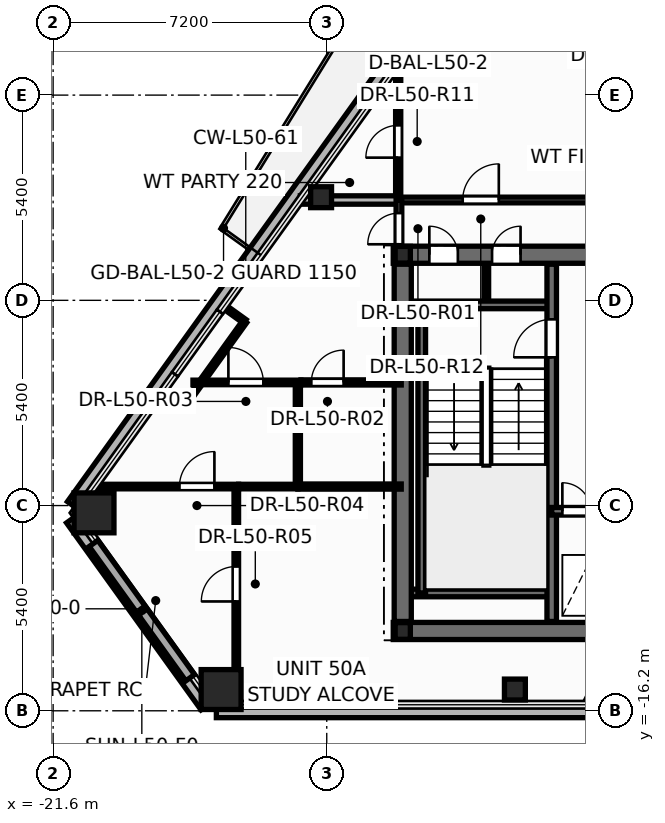
"""IFC4 building model, lengths in metres.
Left out: names, types, materials, properties, quantities, classifications, styles, units other than length and angle.
Written with IfcOpenShell. Run it as: python <this file> out.ifc"""

import sys

from ifc_helpers import new_model, si_unit, direction, frame, frame_2d, origin, origin_2d, place, context, subcontext, project, spatial, rectangle, hollow_rectangle, hollow_circle, i_section, extrude, element, fill, save


model = new_model("IFC4")
c1 = context("Model", 3, precision=1e-05, world=origin(), true_north=direction((0.0, 1.0)))
c2 = subcontext(c1, "Body", "Model", "MODEL_VIEW")
j1 = project(units=[si_unit("LENGTHUNIT", "METRE"), si_unit("PLANEANGLEUNIT", "RADIAN")], contexts=[c1])
p1 = place(None, origin())
s1 = spatial("IfcSite", under=j1, at=p1, CompositionType="ELEMENT")
p2 = place(p1, origin())
s2 = spatial("IfcBuilding", under=s1, at=p2, CompositionType="ELEMENT")
p3 = place(p2, frame((0.0, 0.0, 192.9)))
s3 = spatial("IfcBuildingStorey", under=s2, at=p3, CompositionType="ELEMENT", Elevation=192.9)
for number, where, z_axis, x_axis in (
    (1, (-20.524, -10.992, 0.0), (0.0, 0.0, 1.0), (1.0, 0.0, 0.0)),
    (2, (-17.18, -15.641, 0.0), (0.0, 0.0, 1.0), (1.0, 0.0, 0.0)),
):
    element("IfcColumn", number, at=place(p3, frame(where, z_axis=z_axis, x_axis=x_axis)), inside=s3, PredefinedType="COLUMN", context=c2, shape_type="SweptSolid", body=[
        extrude(hollow_rectangle(XDim=1.05, YDim=1.05, WallThickness=0.045, at=origin_2d()), origin(), (0.0, 0.0, 1.0), 3.6),
    ])
for number, where, z_axis, x_axis in (
    (3, (-9.449, -15.641, 0.0), (0.0, 0.0, 1.0), (1.0, 0.0, 0.0)),
    (4, (-14.549, -2.686, 0.0), (0.0, 0.0, 1.0), (1.0, 0.0, 0.0)),
):
    element("IfcColumn", number, at=place(p3, frame(where, z_axis=z_axis, x_axis=x_axis)), inside=s3, PredefinedType="COLUMN", context=c2, shape_type="SweptSolid", body=[
        extrude(hollow_circle(Radius=0.275, WallThickness=0.024, at=origin_2d()), origin(), (0.0, 0.0, 1.0), 3.6),
    ])
for number, where, z_axis, x_axis in (
    (5, (-12.4, -14.1, 0.0), (0.0, 0.0, 1.0), (1.0, 0.0, 0.0)),
    (6, (-12.4, -4.2, 0.0), (0.0, 0.0, 1.0), (1.0, 0.0, 0.0)),
):
    element("IfcColumn", number, at=place(p3, frame(where, z_axis=z_axis, x_axis=x_axis)), inside=s3, PredefinedType="COLUMN", context=c2, shape_type="SweptSolid", body=[
        extrude(i_section(OverallWidth=0.4, OverallDepth=0.44, WebThickness=0.028, FlangeThickness=0.04, at=origin_2d()), origin(), (0.0, 0.0, 1.0), 3.6),
    ])
p4 = place(p3, frame((-21.1, -11.15, -0.2), z_axis=(0.0, 0.0, 1.0), x_axis=(0.583978848749, -0.811768873642, 0.0)))
e7 = element("IfcWall", 7, at=p4, inside=s3, PredefinedType="PARAPET", context=c2, shape_type="SweptSolid", body=[
    extrude(rectangle(XDim=6.06, YDim=0.36, at=frame_2d((3.03, 0.0))), origin(), (0.0, 0.0, 1.0), 0.38),
])
p5 = place(p3, frame((-17.305, -16.201, -0.2), z_axis=(0.0, 0.0, 1.0), x_axis=(1.0, 0.0, 0.0)))
e8 = element("IfcWall", 8, at=p5, inside=s3, PredefinedType="PARAPET", context=c2, shape_type="SweptSolid", body=[
    extrude(rectangle(XDim=34.609, YDim=0.36, at=frame_2d((17.305, 0.0))), origin(), (0.0, 0.0, 1.0), 0.38),
])
p6 = place(p3, frame((-12.245, 1.475, -0.2), z_axis=(0.0, 0.0, 1.0), x_axis=(-0.583980615351, -0.811767602762, 0.0)))
e9 = element("IfcWall", 9, at=p6, inside=s3, PredefinedType="PARAPET", context=c2, shape_type="SweptSolid", body=[
    extrude(rectangle(XDim=15.123, YDim=0.36, at=frame_2d((7.562, 0.0))), origin(), (0.0, 0.0, 1.0), 0.38),
])
p7 = place(p3, frame((-10.2, -5.52, 0.0), z_axis=(0.0, 0.0, 1.0), x_axis=(0.0, 1.0, 0.0)))
e10 = element("IfcWall", 10, at=p7, inside=s3, PredefinedType="PARTITIONING", context=c2, shape_type="SweptSolid", body=[
    extrude(rectangle(XDim=1.12, YDim=0.12, at=frame_2d((0.56, 0.0))), origin(), (0.0, 0.0, 1.0), 3.35),
])
p8 = place(p3, frame((-12.65, -14.1, 0.0), z_axis=(0.0, 0.0, 1.0), x_axis=(1.0, 0.0, 0.0)))
e11 = element("IfcWall", 11, at=p8, inside=s3, PredefinedType="SHEAR", context=c2, shape_type="SweptSolid", body=[
    extrude(rectangle(XDim=25.3, YDim=0.45, at=frame_2d((12.65, 0.0))), origin(), (0.0, 0.0, 1.0), 3.6),
])
p9 = place(p3, frame((-12.65, -4.2, 0.0), z_axis=(0.0, 0.0, 1.0), x_axis=(1.0, 0.0, 0.0)))
e12 = element("IfcWall", 12, at=p9, inside=s3, PredefinedType="SHEAR", context=c2, shape_type="SweptSolid", body=[
    extrude(rectangle(XDim=25.3, YDim=0.45, at=frame_2d((12.65, 0.0))), origin(), (0.0, 0.0, 1.0), 3.6),
])
p10 = place(p9, frame((0.95, 0.0, 0.0)))
e13 = element("IfcOpeningElement", 13, at=p10, cuts=e12, PredefinedType="OPENING", context=c2, shape_type="SweptSolid", body=[
    extrude(rectangle(XDim=0.756, YDim=2.054, at=frame_2d((0.375, 1.027))), frame((0.0, 0.235, 0.0), z_axis=(0.0, -1.0, 0.0), x_axis=(1.0, 0.0, 0.0)), (0.0, 0.0, 1.0), 0.47),
])
p11 = place(p9, frame((2.6, 0.0, 0.0)))
e14 = element("IfcOpeningElement", 14, at=p11, cuts=e12, PredefinedType="OPENING", context=c2, shape_type="SweptSolid", body=[
    extrude(rectangle(XDim=0.756, YDim=2.054, at=frame_2d((0.375, 1.027))), frame((0.0, 0.235, 0.0), z_axis=(0.0, -1.0, 0.0), x_axis=(1.0, 0.0, 0.0)), (0.0, 0.0, 1.0), 0.47),
])
p12 = place(p9, frame((21.85, 0.0, 0.0)))
e15 = element("IfcOpeningElement", 15, at=p12, cuts=e12, PredefinedType="OPENING", context=c2, shape_type="SweptSolid", body=[
    extrude(rectangle(XDim=0.756, YDim=2.054, at=frame_2d((0.375, 1.027))), frame((0.0, 0.235, 0.0), z_axis=(0.0, -1.0, 0.0), x_axis=(1.0, 0.0, 0.0)), (0.0, 0.0, 1.0), 0.47),
])
p13 = place(p9, frame((23.5, 0.0, 0.0)))
e16 = element("IfcOpeningElement", 16, at=p13, cuts=e12, PredefinedType="OPENING", context=c2, shape_type="SweptSolid", body=[
    extrude(rectangle(XDim=0.756, YDim=2.054, at=frame_2d((0.375, 1.027))), frame((0.0, 0.235, 0.0), z_axis=(0.0, -1.0, 0.0), x_axis=(1.0, 0.0, 0.0)), (0.0, 0.0, 1.0), 0.47),
])
p14 = place(p9, frame((5.85, 0.0, 0.0)))
e17 = element("IfcOpeningElement", 17, at=p14, cuts=e12, PredefinedType="OPENING", context=c2, shape_type="SweptSolid", body=[
    extrude(rectangle(XDim=1.006, YDim=2.104, at=frame_2d((0.5, 1.052))), frame((0.0, 0.235, 0.0), z_axis=(0.0, -1.0, 0.0), x_axis=(1.0, 0.0, 0.0)), (0.0, 0.0, 1.0), 0.47),
])
p15 = place(p9, frame((10.35, 0.0, 0.0)))
e18 = element("IfcOpeningElement", 18, at=p15, cuts=e12, PredefinedType="OPENING", context=c2, shape_type="SweptSolid", body=[
    extrude(rectangle(XDim=1.406, YDim=2.154, at=frame_2d((0.7, 1.077))), frame((0.0, 0.235, 0.0), z_axis=(0.0, -1.0, 0.0), x_axis=(1.0, 0.0, 0.0)), (0.0, 0.0, 1.0), 0.47),
])
p16 = place(p9, frame((18.45, 0.0, 0.0)))
e19 = element("IfcOpeningElement", 19, at=p16, cuts=e12, PredefinedType="OPENING", context=c2, shape_type="SweptSolid", body=[
    extrude(rectangle(XDim=1.006, YDim=2.104, at=frame_2d((0.5, 1.052))), frame((0.0, 0.235, 0.0), z_axis=(0.0, -1.0, 0.0), x_axis=(1.0, 0.0, 0.0)), (0.0, 0.0, 1.0), 0.47),
])
for number, where, z_axis, x_axis in (
    (20, (-12.35, -5.52, 0.0), (0.0, 0.0, 1.0), (1.0, 0.0, 0.0)),
    (21, (-12.35, -13.1, 0.0), (0.0, 0.0, 1.0), (1.0, 0.0, 0.0)),
):
    element("IfcWall", number, at=place(p3, frame(where, z_axis=z_axis, x_axis=x_axis)), inside=s3, PredefinedType="SOLIDWALL", context=c2, shape_type="SweptSolid", body=[
        extrude(rectangle(XDim=3.87, YDim=0.2, at=frame_2d((1.935, 0.0))), origin(), (0.0, 0.0, 1.0), 3.6),
    ])
p17 = place(p3, frame((-11.9, -13.1, 0.0), z_axis=(0.0, 0.0, 1.0), x_axis=(0.0, 1.0, 0.0)))
e22 = element("IfcWall", 22, at=p17, inside=s3, PredefinedType="SOLIDWALL", context=c2, shape_type="SweptSolid", body=[
    extrude(rectangle(XDim=7.58, YDim=0.2, at=frame_2d((3.79, 0.0))), origin(), (0.0, 0.0, 1.0), 3.6),
])
p18 = place(p3, frame((-8.48, -13.85, 0.0), z_axis=(0.0, 0.0, 1.0), x_axis=(0.0, 1.0, 0.0)))
e23 = element("IfcWall", 23, at=p18, inside=s3, PredefinedType="SHEAR", context=c2, shape_type="SweptSolid", body=[
    extrude(rectangle(XDim=9.4, YDim=0.25, at=frame_2d((4.7, 0.0))), origin(), (0.0, 0.0, 1.0), 3.6),
])
p19 = place(p18, frame((6.95, 0.0, 0.0)))
e24 = element("IfcOpeningElement", 24, at=p19, cuts=e23, PredefinedType="OPENING", context=c2, shape_type="SweptSolid", body=[
    extrude(rectangle(XDim=1.006, YDim=2.104, at=frame_2d((0.5, 1.052))), frame((0.0, 0.135, 0.0), z_axis=(0.0, -1.0, 0.0), x_axis=(1.0, 0.0, 0.0)), (0.0, 0.0, 1.0), 0.27),
])
p20 = place(p3, frame((-8.48, -10.95, 0.0), z_axis=(0.0, 0.0, 1.0), x_axis=(1.0, 0.0, 0.0)))
e25 = element("IfcWall", 25, at=p20, inside=s3, PredefinedType="SOLIDWALL", context=c2, shape_type="SweptSolid", body=[
    extrude(rectangle(XDim=3.36, YDim=0.2, at=frame_2d((1.68, 0.0))), origin(), (0.0, 0.0, 1.0), 3.6),
])
p21 = place(p20, frame((0.28, 0.0, 0.0)))
e26 = element("IfcOpeningElement", 26, at=p21, cuts=e25, PredefinedType="OPENING", context=c2, shape_type="SweptSolid", body=[
    extrude(rectangle(XDim=0.756, YDim=2.054, at=frame_2d((0.375, 1.027))), frame((0.0, 0.11, 0.0), z_axis=(0.0, -1.0, 0.0), x_axis=(1.0, 0.0, 0.0)), (0.0, 0.0, 1.0), 0.22),
])
p22 = place(p20, frame((1.85, 0.0, 0.0)))
e27 = element("IfcOpeningElement", 27, at=p22, cuts=e25, PredefinedType="OPENING", context=c2, shape_type="SweptSolid", body=[
    extrude(rectangle(XDim=1.106, YDim=2.104, at=frame_2d((0.55, 1.052))), frame((0.0, 0.11, 0.0), z_axis=(0.0, -1.0, 0.0), x_axis=(1.0, 0.0, 0.0)), (0.0, 0.0, 1.0), 0.22),
])
p23 = place(p3, frame((-12.4, -13.85, 0.0), z_axis=(0.0, 0.0, 1.0), x_axis=(0.0, 1.0, 0.0)))
e28 = element("IfcWall", 28, at=p23, inside=s3, PredefinedType="SHEAR", context=c2, shape_type="SweptSolid", body=[
    extrude(rectangle(XDim=9.4, YDim=0.45, at=frame_2d((4.7, 0.0))), origin(), (0.0, 0.0, 1.0), 3.6),
])
p24 = place(p3, frame((-12.5, -2.76, 0.0), z_axis=(0.0, 0.0, 1.0), x_axis=(1.0, 0.0, 0.0)))
e29 = element("IfcWall", 29, at=p24, inside=s3, PredefinedType="PARTITIONING", context=c2, shape_type="SweptSolid", body=[
    extrude(rectangle(XDim=8.18, YDim=0.15, at=frame_2d((4.09, 0.0))), origin(), (0.0, 0.0, 1.0), 2.325),
])
p25 = place(p24, frame((1.678, 0.0, 0.0)))
e30 = element("IfcOpeningElement", 30, at=p25, cuts=e29, PredefinedType="OPENING", context=c2, shape_type="SweptSolid", body=[
    extrude(rectangle(XDim=0.956, YDim=2.104, at=frame_2d((0.475, 1.052))), frame((0.0, 0.085, 0.0), z_axis=(0.0, -1.0, 0.0), x_axis=(1.0, 0.0, 0.0)), (0.0, 0.0, 1.0), 0.17),
])
p26 = place(p3, frame((-16.78, -16.041, 0.0), z_axis=(0.0, 0.0, 1.0), x_axis=(0.0, 1.0, 0.0)))
e31 = element("IfcWall", 31, at=p26, inside=s3, PredefinedType="PARTITIONING", context=c2, shape_type="SweptSolid", body=[
    extrude(rectangle(XDim=5.741, YDim=0.12, at=frame_2d((2.871, 0.0))), origin(), (0.0, 0.0, 1.0), 2.792),
])
p27 = place(p26, frame((2.718, 0.0, 0.0)))
e32 = element("IfcOpeningElement", 32, at=p27, cuts=e31, PredefinedType="OPENING", context=c2, shape_type="SweptSolid", body=[
    extrude(rectangle(XDim=0.926, YDim=2.104, at=frame_2d((0.46, 1.052))), frame((0.0, 0.07, 0.0), z_axis=(0.0, -1.0, 0.0), x_axis=(1.0, 0.0, 0.0)), (0.0, 0.0, 1.0), 0.14),
])
p28 = place(p3, frame((-20.519, -10.3, 0.0), z_axis=(0.0, 0.0, 1.0), x_axis=(1.0, 0.0, 0.0)))
e33 = element("IfcWall", 33, at=p28, inside=s3, PredefinedType="PARTITIONING", context=c2, shape_type="SweptSolid", body=[
    extrude(rectangle(XDim=3.799, YDim=0.12, at=frame_2d((1.899, 0.0))), origin(), (0.0, 0.0, 1.0), 2.325),
])
p29 = place(p28, frame((2.243, 0.0, 0.0)))
e34 = element("IfcOpeningElement", 34, at=p29, cuts=e33, PredefinedType="OPENING", context=c2, shape_type="SweptSolid", body=[
    extrude(rectangle(XDim=0.926, YDim=2.104, at=frame_2d((0.46, 1.052))), frame((0.0, 0.07, 0.0), z_axis=(0.0, -1.0, 0.0), x_axis=(1.0, 0.0, 0.0)), (0.0, 0.0, 1.0), 0.14),
])
p30 = place(p3, frame((-12.52, -2.76, 0.0), z_axis=(0.0, 0.0, 1.0), x_axis=(0.0, 1.0, 0.0)))
e35 = element("IfcWall", 35, at=p30, inside=s3, PredefinedType="PARTITIONING", context=c2, shape_type="SweptSolid", body=[
    extrude(rectangle(XDim=3.579, YDim=0.135, at=frame_2d((1.79, 0.0))), origin(), (0.0, 0.0, 1.0), 2.625),
])
p31 = place(p30, frame((1.115, 0.0, 0.0)))
e36 = element("IfcOpeningElement", 36, at=p31, cuts=e35, PredefinedType="OPENING", context=c2, shape_type="SweptSolid", body=[
    extrude(rectangle(XDim=0.856, YDim=2.104, at=frame_2d((0.425, 1.052))), frame((0.0, 0.078, 0.0), z_axis=(0.0, -1.0, 0.0), x_axis=(1.0, 0.0, 0.0)), (0.0, 0.0, 1.0), 0.155),
])
p32 = place(p3, frame((-17.92, -7.56, 0.0), z_axis=(0.0, 0.0, 1.0), x_axis=(1.0, 0.0, 0.0)))
e37 = element("IfcWall", 37, at=p32, inside=s3, PredefinedType="PARTITIONING", context=c2, shape_type="SweptSolid", body=[
    extrude(rectangle(XDim=2.84, YDim=0.12, at=frame_2d((1.42, 0.0))), origin(), (0.0, 0.0, 1.0), 2.325),
])
p33 = place(p32, frame((0.932, 0.0, 0.0)))
e38 = element("IfcOpeningElement", 38, at=p33, cuts=e37, PredefinedType="OPENING", context=c2, shape_type="SweptSolid", body=[
    extrude(rectangle(XDim=0.926, YDim=2.104, at=frame_2d((0.46, 1.052))), frame((0.0, 0.07, 0.0), z_axis=(0.0, -1.0, 0.0), x_axis=(1.0, 0.0, 0.0)), (0.0, 0.0, 1.0), 0.14),
])
p34 = place(p3, frame((-15.078, -7.56, 0.0), z_axis=(0.0, 0.0, 1.0), x_axis=(1.0, 0.0, 0.0)))
e39 = element("IfcWall", 39, at=p34, inside=s3, PredefinedType="PARTITIONING", context=c2, shape_type="SweptSolid", body=[
    extrude(rectangle(XDim=2.638, YDim=0.135, at=frame_2d((1.319, 0.0))), origin(), (0.0, 0.0, 1.0), 2.792),
])
p35 = place(p34, frame((0.272, 0.0, 0.0)))
e40 = element("IfcOpeningElement", 40, at=p35, cuts=e39, PredefinedType="OPENING", context=c2, shape_type="SweptSolid", body=[
    extrude(rectangle(XDim=0.856, YDim=2.104, at=frame_2d((0.425, 1.052))), frame((0.0, 0.078, 0.0), z_axis=(0.0, -1.0, 0.0), x_axis=(1.0, 0.0, 0.0)), (0.0, 0.0, 1.0), 0.155),
])
p36 = place(p3, frame((-15.16, -10.3, 0.0), z_axis=(0.0, 0.0, 1.0), x_axis=(0.0, 1.0, 0.0)))
e41 = element("IfcWall", 41, at=p36, inside=s3, PredefinedType="PARTITIONING", context=c2, shape_type="SweptSolid", body=[
    extrude(rectangle(XDim=2.74, YDim=0.135, at=frame_2d((1.37, 0.0))), origin(), (0.0, 0.0, 1.0), 3.35),
])
p37 = place(p3, frame((-15.16, -10.3, 0.0), z_axis=(0.0, 0.0, 1.0), x_axis=(1.0, 0.0, 0.0)))
e42 = element("IfcWall", 42, at=p37, inside=s3, PredefinedType="PARTITIONING", context=c2, shape_type="SweptSolid", body=[
    extrude(rectangle(XDim=2.72, YDim=0.135, at=frame_2d((1.36, 0.0))), origin(), (0.0, 0.0, 1.0), 2.792),
])
p38 = place(p3, frame((-15.095, -2.76, 0.0), z_axis=(0.0, 0.0, 1.0), x_axis=(1.0, 0.0, 0.0)))
e43 = element("IfcWall", 43, at=p38, inside=s3, PredefinedType="PARTITIONING", context=c2, shape_type="SweptSolid", body=[
    extrude(rectangle(XDim=2.595, YDim=0.22, at=frame_2d((1.297, 0.0))), origin(), (0.0, 0.0, 1.0), 2.625),
])
p39 = place(p3, frame((-16.556, -5.956, 0.0), z_axis=(0.0, 0.0, 1.0), x_axis=(-0.583963896956, -0.811779629611, 0.0)))
e44 = element("IfcWall", 44, at=p39, inside=s3, PredefinedType="PARTITIONING", context=c2, shape_type="SweptSolid", body=[
    extrude(rectangle(XDim=2.378, YDim=0.12, at=frame_2d((1.189, 0.0))), origin(), (0.0, 0.0, 1.0), 3.35),
])
p40 = place(p3, frame((-16.718, -10.3, 0.0), z_axis=(0.0, 0.0, 1.0), x_axis=(1.0, 0.0, 0.0)))
e45 = element("IfcWall", 45, at=p40, inside=s3, PredefinedType="PARTITIONING", context=c2, shape_type="SweptSolid", body=[
    extrude(rectangle(XDim=1.558, YDim=0.12, at=frame_2d((0.779, 0.0))), origin(), (0.0, 0.0, 1.0), 3.35),
])
p41 = place(p3, frame((-12.5, -4.24, 0.0), z_axis=(0.0, 0.0, 1.0), x_axis=(0.0, 1.0, 0.0)))
e46 = element("IfcWall", 46, at=p41, inside=s3, PredefinedType="PARTITIONING", context=c2, shape_type="SweptSolid", body=[
    extrude(rectangle(XDim=1.48, YDim=0.15, at=frame_2d((0.74, 0.0))), origin(), (0.0, 0.0, 1.0), 2.325),
])
p42 = place(p41, frame((0.315, 0.0, 0.0)))
e47 = element("IfcOpeningElement", 47, at=p42, cuts=e46, PredefinedType="OPENING", context=c2, shape_type="SweptSolid", body=[
    extrude(rectangle(XDim=0.826, YDim=2.104, at=frame_2d((0.41, 1.052))), frame((0.0, 0.085, 0.0), z_axis=(0.0, -1.0, 0.0), x_axis=(1.0, 0.0, 0.0)), (0.0, 0.0, 1.0), 0.17),
])
p43 = place(p3, frame((-17.945, -7.886, 0.0), z_axis=(0.0, 0.0, 1.0), x_axis=(-0.996387556444, -0.084922537432, 0.0)))
e48 = element("IfcWall", 48, at=p43, inside=s3, PredefinedType="PARTITIONING", context=c2, shape_type="SweptSolid", body=[
    extrude(rectangle(XDim=0.883, YDim=0.12, at=frame_2d((0.441, 0.0))), origin(), (0.0, 0.0, 1.0), 2.792),
])
p44 = place(p3, frame((-7.576, -16.031, 0.0), z_axis=(0.0, 0.0, 1.0), x_axis=(0.450593916723, 0.892729030676, 0.0)))
e49 = element("IfcWall", 49, at=p44, inside=s3, PredefinedType="PARTITIONING", context=c2, shape_type="SweptSolid", body=[
    extrude(rectangle(XDim=0.75, YDim=0.12, at=frame_2d((0.375, 0.0))), origin(), (0.0, 0.0, 1.0), 2.792),
])
p45 = place(p3, frame((-17.1, -5.565, 0.0), z_axis=(0.0, 0.0, 1.0), x_axis=(0.811907418628, -0.583786213932, 0.0)))
e50 = element("IfcWall", 50, at=p45, inside=s3, PredefinedType="PARTITIONING", context=c2, shape_type="SweptSolid", body=[
    extrude(rectangle(XDim=0.67, YDim=0.12, at=frame_2d((0.335, 0.0))), origin(), (0.0, 0.0, 1.0), 2.792),
])
p46 = place(p19, origin())
e51 = element("IfcDoor", 51, at=p46, inside=s3, OperationType="SINGLE_SWING_LEFT", PredefinedType="DOOR", context=c2, shape_type="SweptSolid", body=[
    extrude(rectangle(XDim=1.0, YDim=2.1, at=frame_2d((0.5, 1.05))), frame((0.0, 0.025, 0.0), z_axis=(0.0, -1.0, 0.0), x_axis=(1.0, 0.0, 0.0)), (0.0, 0.0, 1.0), 0.05),
])
fill(e24, e51)
p47 = place(p21, origin())
e52 = element("IfcDoor", 52, at=p47, inside=s3, OperationType="SINGLE_SWING_LEFT", PredefinedType="DOOR", context=c2, shape_type="SweptSolid", body=[
    extrude(rectangle(XDim=0.75, YDim=2.05, at=frame_2d((0.375, 1.025))), frame((0.0, 0.025, 0.0), z_axis=(0.0, -1.0, 0.0), x_axis=(1.0, 0.0, 0.0)), (0.0, 0.0, 1.0), 0.05),
])
fill(e26, e52)
p48 = place(p10, origin())
e53 = element("IfcDoor", 53, at=p48, inside=s3, OperationType="SINGLE_SWING_LEFT", PredefinedType="DOOR", context=c2, shape_type="SweptSolid", body=[
    extrude(rectangle(XDim=0.75, YDim=2.05, at=frame_2d((0.375, 1.025))), frame((0.0, 0.025, 0.0), z_axis=(0.0, -1.0, 0.0), x_axis=(1.0, 0.0, 0.0)), (0.0, 0.0, 1.0), 0.05),
])
fill(e13, e53)
p49 = place(p11, origin())
e54 = element("IfcDoor", 54, at=p49, inside=s3, OperationType="SINGLE_SWING_RIGHT", PredefinedType="DOOR", context=c2, shape_type="SweptSolid", body=[
    extrude(rectangle(XDim=0.75, YDim=2.05, at=frame_2d((0.375, 1.025))), frame((0.0, 0.025, 0.0), z_axis=(0.0, -1.0, 0.0), x_axis=(1.0, 0.0, 0.0)), (0.0, 0.0, 1.0), 0.05),
])
fill(e14, e54)
p50 = place(p42, origin())
e55 = element("IfcDoor", 55, at=p50, inside=s3, OperationType="SINGLE_SWING_LEFT", PredefinedType="DOOR", context=c2, shape_type="SweptSolid", body=[
    extrude(rectangle(XDim=0.82, YDim=2.1, at=frame_2d((0.41, 1.05))), frame((0.0, 0.025, 0.0), z_axis=(0.0, -1.0, 0.0), x_axis=(1.0, 0.0, 0.0)), (0.0, 0.0, 1.0), 0.05),
])
fill(e47, e55)
p51 = place(p35, origin())
e56 = element("IfcDoor", 56, at=p51, inside=s3, OperationType="SINGLE_SWING_RIGHT", PredefinedType="DOOR", context=c2, shape_type="SweptSolid", body=[
    extrude(rectangle(XDim=0.85, YDim=2.1, at=frame_2d((0.425, 1.05))), frame((0.0, 0.025, 0.0), z_axis=(0.0, -1.0, 0.0), x_axis=(1.0, 0.0, 0.0)), (0.0, 0.0, 1.0), 0.05),
])
fill(e40, e56)
p52 = place(p33, origin())
e57 = element("IfcDoor", 57, at=p52, inside=s3, OperationType="SINGLE_SWING_LEFT", PredefinedType="DOOR", context=c2, shape_type="SweptSolid", body=[
    extrude(rectangle(XDim=0.92, YDim=2.1, at=frame_2d((0.46, 1.05))), frame((0.0, 0.025, 0.0), z_axis=(0.0, -1.0, 0.0), x_axis=(1.0, 0.0, 0.0)), (0.0, 0.0, 1.0), 0.05),
])
fill(e38, e57)
p53 = place(p29, origin())
e58 = element("IfcDoor", 58, at=p53, inside=s3, OperationType="SINGLE_SWING_RIGHT", PredefinedType="DOOR", context=c2, shape_type="SweptSolid", body=[
    extrude(rectangle(XDim=0.92, YDim=2.1, at=frame_2d((0.46, 1.05))), frame((0.0, 0.025, 0.0), z_axis=(0.0, -1.0, 0.0), x_axis=(1.0, 0.0, 0.0)), (0.0, 0.0, 1.0), 0.05),
])
fill(e34, e58)
p54 = place(p27, origin())
e59 = element("IfcDoor", 59, at=p54, inside=s3, OperationType="SINGLE_SWING_LEFT", PredefinedType="DOOR", context=c2, shape_type="SweptSolid", body=[
    extrude(rectangle(XDim=0.92, YDim=2.1, at=frame_2d((0.46, 1.05))), frame((0.0, 0.025, 0.0), z_axis=(0.0, -1.0, 0.0), x_axis=(1.0, 0.0, 0.0)), (0.0, 0.0, 1.0), 0.05),
])
fill(e32, e59)
p55 = place(p31, origin())
e60 = element("IfcDoor", 60, at=p55, inside=s3, OperationType="SINGLE_SWING_LEFT", PredefinedType="DOOR", context=c2, shape_type="SweptSolid", body=[
    extrude(rectangle(XDim=0.85, YDim=2.1, at=frame_2d((0.425, 1.05))), frame((0.0, 0.025, 0.0), z_axis=(0.0, -1.0, 0.0), x_axis=(1.0, 0.0, 0.0)), (0.0, 0.0, 1.0), 0.05),
])
fill(e36, e60)
p56 = place(p25, origin())
e61 = element("IfcDoor", 61, at=p56, inside=s3, OperationType="SINGLE_SWING_RIGHT", PredefinedType="DOOR", context=c2, shape_type="SweptSolid", body=[
    extrude(rectangle(XDim=0.95, YDim=2.1, at=frame_2d((0.475, 1.05))), frame((0.0, 0.025, 0.0), z_axis=(0.0, -1.0, 0.0), x_axis=(1.0, 0.0, 0.0)), (0.0, 0.0, 1.0), 0.05),
])
fill(e30, e61)
save(model, sys.argv[1])
